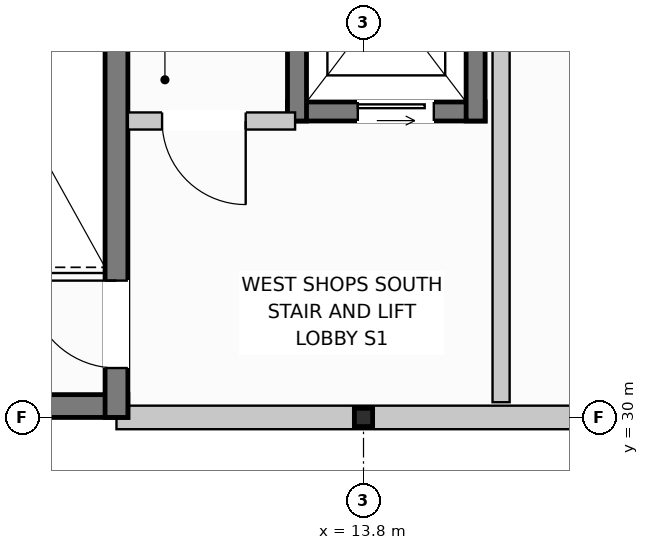
"""IFC4 building model, lengths in metres.
Left out: names, types, materials, properties, quantities, classifications, styles, units other than length and angle.
Written with IfcOpenShell. Run it as: python <this file> out.ifc"""

import sys

from ifc_helpers import new_model, si_unit, direction, frame, frame_2d, origin, origin_with_axes, origin_2d, place, context, subcontext, project, spatial, rectangle, i_section, extrude, element, fill, save


model = new_model("IFC4")
c1 = context("Model", 3, precision=1e-05, world=origin(), true_north=direction((0.0, 1.0)))
c2 = subcontext(c1, "Body", "Model", "MODEL_VIEW")
j1 = project(units=[si_unit("LENGTHUNIT", "METRE"), si_unit("PLANEANGLEUNIT", "RADIAN")], contexts=[c1])
p1 = place(None, origin())
s1 = spatial("IfcSite", under=j1, at=p1, CompositionType="ELEMENT")
p2 = place(p1, origin())
s2 = spatial("IfcBuilding", under=s1, at=p2, CompositionType="ELEMENT")
p3 = place(p2, frame((0.0, 0.0, 8.0)))
s3 = spatial("IfcBuildingStorey", under=s2, at=p3, CompositionType="ELEMENT", Elevation=8.0)
p4 = place(p3, frame((13.8, 30.0, 0.0), z_axis=(0.0, 0.0, 1.0), x_axis=(1.0, 0.0, 0.0)))
e1 = element("IfcColumn", 1, at=p4, inside=s3, PredefinedType="COLUMN", context=c2, shape_type="SweptSolid", body=[
    extrude(i_section(OverallWidth=0.24, OverallDepth=0.24, WebThickness=0.01, FlangeThickness=0.017, at=origin_2d()), origin(), (0.0, 0.0, 1.0), 3.2),
])
p5 = place(p3, frame((10.55, 30.0, 0.0), z_axis=(0.0, 0.0, 1.0), x_axis=(1.0, 0.0, 0.0)))
e2 = element("IfcWall", 2, at=p5, inside=s3, PredefinedType="STANDARD", context=c2, shape_type="SweptSolid", body=[
    extrude(rectangle(XDim=10.15, YDim=0.31, at=frame_2d((5.075, 0.0))), origin(), (0.0, 0.0, 1.0), 2.62),
])
p6 = place(p5, frame((6.925, 0.0, 0.72)))
e3 = element("IfcOpeningElement", 3, at=p6, cuts=e2, PredefinedType="OPENING", context=c2, shape_type="SweptSolid", body=[
    extrude(rectangle(XDim=1.35, YDim=1.6, at=frame_2d((0.675, 0.8))), frame((0.0, 0.167, 0.0), z_axis=(0.0, -1.0, 0.0), x_axis=(1.0, 0.0, 0.0)), (0.0, 0.0, 1.0), 0.334),
])
p7 = place(p3, frame((7.2, 30.15, 0.0), z_axis=(0.0, 0.0, 1.0), x_axis=(1.0, 0.0, 0.0)))
e4 = element("IfcWall", 4, at=p7, inside=s3, PredefinedType="SHEAR", context=c2, shape_type="SweptSolid", body=[
    extrude(rectangle(XDim=3.5, YDim=0.3, at=frame_2d((1.75, 0.0))), origin(), (0.0, 0.0, 1.0), 2.94),
])
p8 = place(p3, frame((10.55, 30.0, 0.0), z_axis=(0.0, 0.0, 1.0), x_axis=(0.0, 1.0, 0.0)))
e5 = element("IfcWall", 5, at=p8, inside=s3, PredefinedType="SHEAR", context=c2, shape_type="SweptSolid", body=[
    extrude(rectangle(XDim=7.5, YDim=0.3, at=frame_2d((3.75, 0.0))), origin(), (0.0, 0.0, 1.0), 2.94),
])
p9 = place(p8, frame((0.65, 0.0, 0.0)))
e6 = element("IfcOpeningElement", 6, at=p9, cuts=e5, PredefinedType="OPENING", context=c2, shape_type="SweptSolid", body=[
    extrude(rectangle(XDim=1.15, YDim=2.15, at=frame_2d((0.575, 1.075))), frame((0.0, 0.162, 0.0), z_axis=(0.0, -1.0, 0.0), x_axis=(1.0, 0.0, 0.0)), (0.0, 0.0, 1.0), 0.324),
])
p10 = place(p3, frame((12.8, 34.025, 0.0), z_axis=(0.0, 0.0, 1.0), x_axis=(1.0, 0.0, 0.0)))
e7 = element("IfcWall", 7, at=p10, inside=s3, PredefinedType="SHEAR", context=c2, shape_type="SweptSolid", body=[
    extrude(rectangle(XDim=2.6, YDim=0.25, at=frame_2d((1.3, 0.0))), origin(), (0.0, 0.0, 1.0), 2.94),
])
p11 = place(p10, frame((0.925, 0.0, 0.0)))
e8 = element("IfcOpeningElement", 8, at=p11, cuts=e7, PredefinedType="OPENING", context=c2, shape_type="SweptSolid", body=[
    extrude(rectangle(XDim=1.0, YDim=2.1, at=frame_2d((0.5, 1.05))), frame((0.0, 0.137, 0.0), z_axis=(0.0, -1.0, 0.0), x_axis=(1.0, 0.0, 0.0)), (0.0, 0.0, 1.0), 0.274),
])
for number, where, z_axis, x_axis in (
    (9, (12.925, 33.9, 0.0), (0.0, 0.0, 1.0), (0.0, 1.0, 0.0)),
    (10, (15.275, 33.9, 0.0), (0.0, 0.0, 1.0), (0.0, 1.0, 0.0)),
):
    element("IfcWall", number, at=place(p3, frame(where, z_axis=z_axis, x_axis=x_axis)), inside=s3, PredefinedType="SHEAR", context=c2, shape_type="SweptSolid", body=[
        extrude(rectangle(XDim=3.25, YDim=0.25, at=frame_2d((1.625, 0.0))), origin(), (0.0, 0.0, 1.0), 2.94),
    ])
p12 = place(p3, frame((15.61, 30.2, 0.0), z_axis=(0.0, 0.0, 1.0), x_axis=(0.0, 1.0, 0.0)))
e11 = element("IfcWall", 11, at=p12, inside=s3, PredefinedType="PARTITIONING", context=c2, shape_type="SweptSolid", body=[
    extrude(rectangle(XDim=7.6, YDim=0.225, at=frame_2d((3.8, 0.0))), origin(), (0.0, 0.0, 1.0), 2.94),
])
p13 = place(p3, frame((10.7, 33.9, 0.0), z_axis=(0.0, 0.0, 1.0), x_axis=(1.0, 0.0, 0.0)))
e12 = element("IfcWall", 12, at=p13, inside=s3, PredefinedType="PARTITIONING", context=c2, shape_type="SweptSolid", body=[
    extrude(rectangle(XDim=2.2, YDim=0.225, at=frame_2d((1.1, 0.0))), origin(), (0.0, 0.0, 1.0), 2.94),
])
p14 = place(p13, frame((0.45, 0.0, 0.0)))
e13 = element("IfcOpeningElement", 13, at=p14, cuts=e12, PredefinedType="OPENING", context=c2, shape_type="SweptSolid", body=[
    extrude(rectangle(XDim=1.1, YDim=2.15, at=frame_2d((0.55, 1.075))), frame((0.0, 0.125, 0.0), z_axis=(0.0, -1.0, 0.0), x_axis=(1.0, 0.0, 0.0)), (0.0, 0.0, 1.0), 0.249),
])
p15 = place(p9, origin_with_axes())
e14 = element("IfcDoor", 14, at=p15, inside=s3, OperationType="SINGLE_SWING_RIGHT", PredefinedType="DOOR", context=c2, shape_type="SweptSolid", body=[
    extrude(rectangle(XDim=1.15, YDim=2.15, at=frame_2d((0.575, 1.075))), frame((0.0, 0.025, 0.0), z_axis=(0.0, -1.0, 0.0), x_axis=(1.0, 0.0, 0.0)), (0.0, 0.0, 1.0), 0.05),
])
fill(e6, e14)
p16 = place(p11, origin_with_axes())
e15 = element("IfcDoor", 15, at=p16, inside=s3, OperationType="SLIDING_TO_LEFT", PredefinedType="DOOR", context=c2, shape_type="SweptSolid", body=[
    extrude(rectangle(XDim=1.0, YDim=2.1, at=frame_2d((0.5, 1.05))), frame((0.0, 0.025, 0.0), z_axis=(0.0, -1.0, 0.0), x_axis=(1.0, 0.0, 0.0)), (0.0, 0.0, 1.0), 0.05),
])
fill(e8, e15)
p17 = place(p14, frame((1.1, 0.0, 0.0), z_axis=(0.0, 0.0, 1.0), x_axis=(-1.0, 0.0, 0.0)))
e16 = element("IfcDoor", 16, at=p17, inside=s3, OperationType="SINGLE_SWING_RIGHT", PredefinedType="DOOR", context=c2, shape_type="SweptSolid", body=[
    extrude(rectangle(XDim=1.1, YDim=2.15, at=frame_2d((0.55, 1.075))), frame((0.0, 0.025, 0.0), z_axis=(0.0, -1.0, 0.0), x_axis=(1.0, 0.0, 0.0)), (0.0, 0.0, 1.0), 0.05),
])
fill(e13, e16)
save(model, sys.argv[1])
